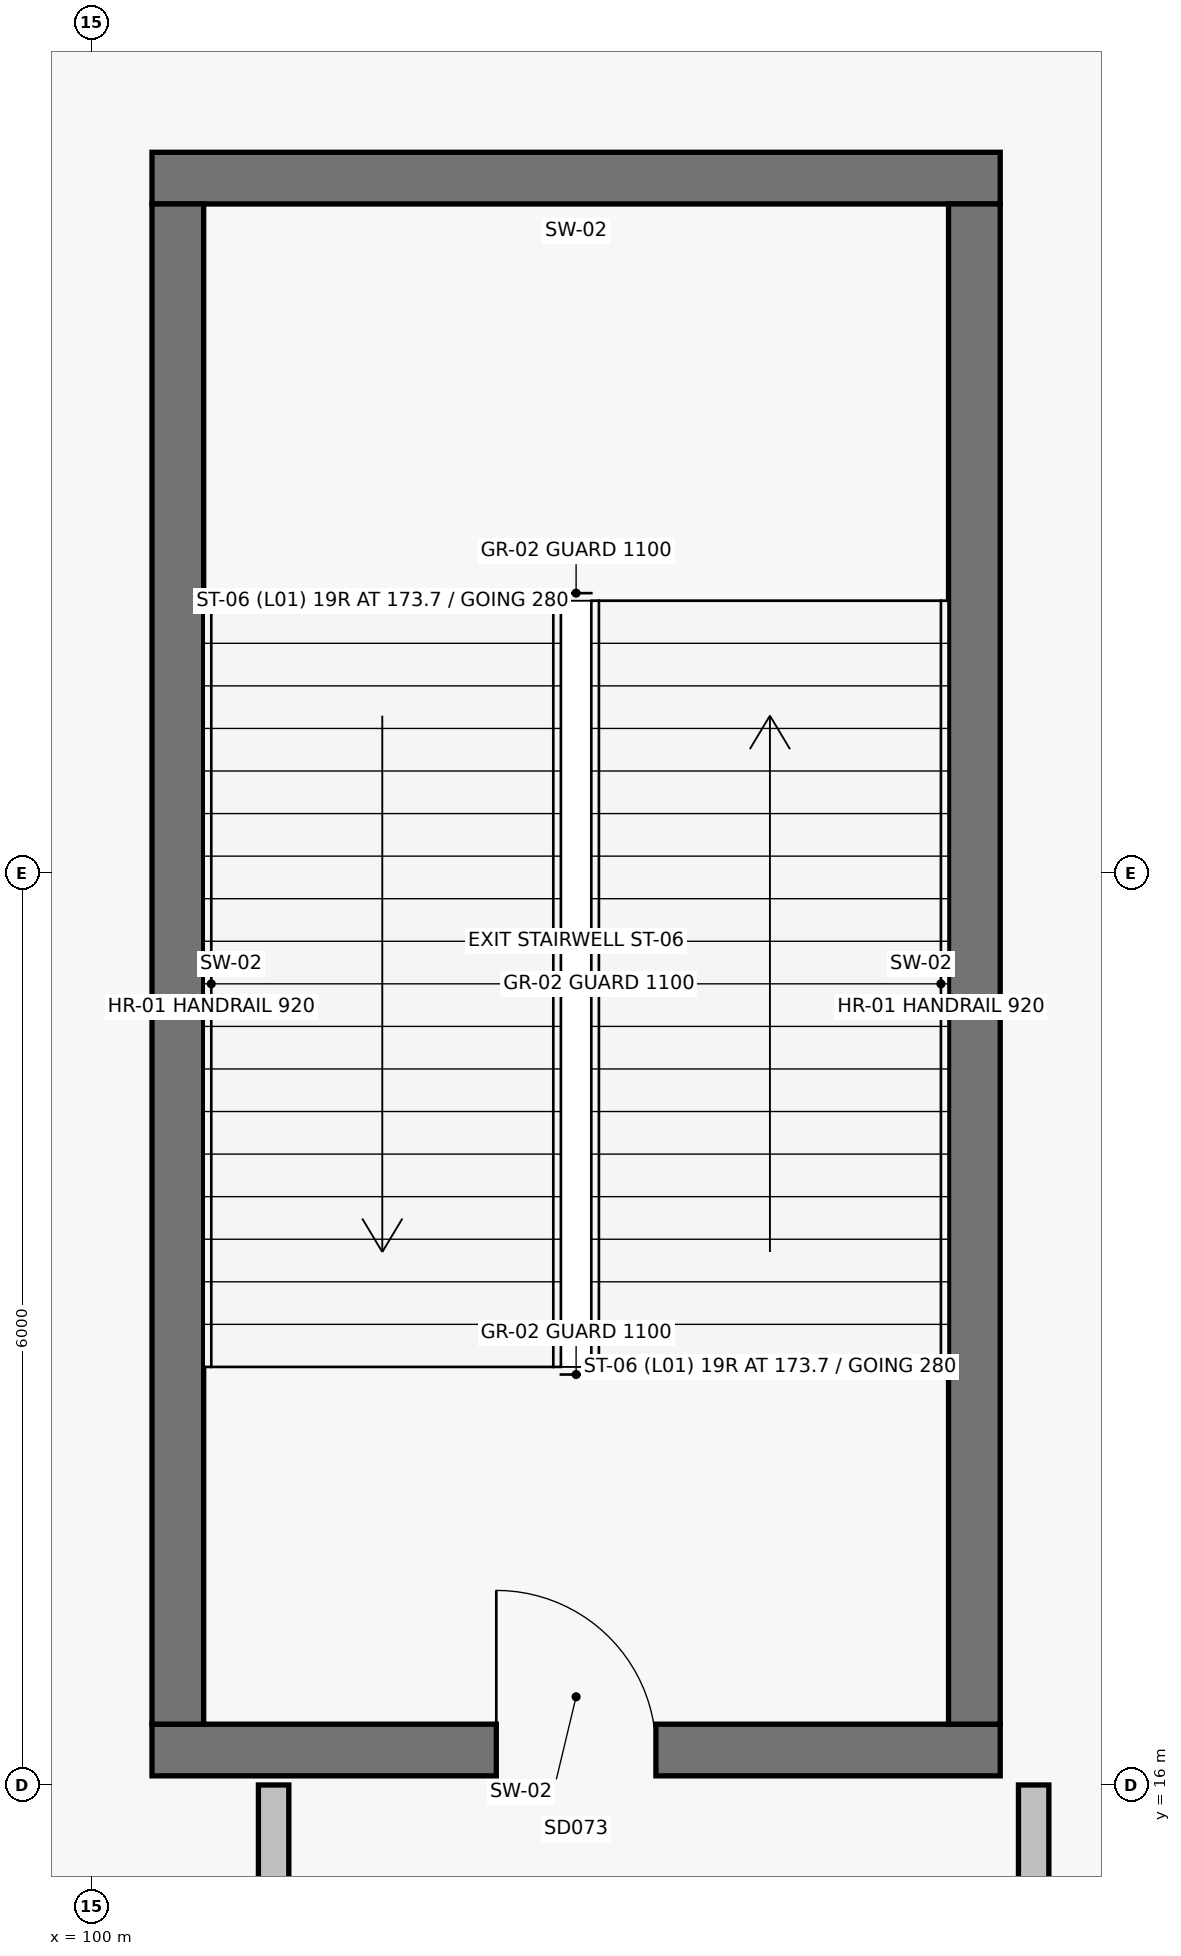
"""IFC4 building model, lengths in metres.
Left out: names, types, materials, properties, quantities, classifications, styles, units other than length and angle.
Written with IfcOpenShell. Run it as: python <this file> out.ifc"""

import sys

from ifc_helpers import new_model, si_unit, direction, frame, frame_2d, origin, origin_2d, place, context, subcontext, project, spatial, rectangle, hollow_rectangle, extrude, element, fill, save


model = new_model("IFC4")
c1 = context("Model", 3, precision=1e-05, world=origin(), true_north=direction((0.0, 1.0)))
c2 = subcontext(c1, "Body", "Model", "MODEL_VIEW")
j1 = project(units=[si_unit("LENGTHUNIT", "METRE"), si_unit("PLANEANGLEUNIT", "RADIAN")], contexts=[c1])
p1 = place(None, origin())
s1 = spatial("IfcSite", under=j1, at=p1, CompositionType="ELEMENT")
p2 = place(p1, origin())
s2 = spatial("IfcBuilding", under=s1, at=p2, CompositionType="ELEMENT")
p3 = place(p2, origin())
s3 = spatial("IfcBuildingStorey", under=s2, at=p3, CompositionType="ELEMENT", Elevation=0.0)
p4 = place(p3, frame((100.0, 16.0, 0.0), z_axis=(0.0, 0.0, 1.0), x_axis=(1.0, 0.0, 0.0)))
e1 = element("IfcColumn", 1, at=p4, inside=s3, PredefinedType="COLUMN", context=c2, shape_type="SweptSolid", body=[
    extrude(hollow_rectangle(XDim=0.305, YDim=0.305, WallThickness=0.013, InnerFilletRadius=0.013, OuterFilletRadius=0.025, at=origin_2d()), origin(), (0.0, 0.0, 1.0), 6.6),
])
p5 = place(p3, frame((100.4, 16.23, 0.0), z_axis=(0.0, 0.0, 1.0), x_axis=(1.0, 0.0, 0.0)))
e2 = element("IfcWall", 2, at=p5, inside=s3, PredefinedType="SHEAR", context=c2, shape_type="SweptSolid", body=[
    extrude(rectangle(XDim=5.58, YDim=0.34, at=frame_2d((2.79, 0.0))), origin(), (0.0, 0.0, 1.0), 6.32),
])
p6 = place(p5, frame((2.265, 0.0, 0.0)))
e3 = element("IfcOpeningElement", 3, at=p6, cuts=e2, PredefinedType="OPENING", context=c2, shape_type="SweptSolid", body=[
    extrude(rectangle(XDim=1.05, YDim=2.15, at=frame_2d((0.525, 1.075))), frame((0.0, 0.185, 0.0), z_axis=(0.0, -1.0, 0.0), x_axis=(1.0, 0.0, 0.0)), (0.0, 0.0, 1.0), 0.37),
])
p7 = place(p3, frame((105.98, 26.57, 0.0), z_axis=(0.0, 0.0, 1.0), x_axis=(-1.0, 0.0, 0.0)))
e4 = element("IfcWall", 4, at=p7, inside=s3, PredefinedType="SHEAR", context=c2, shape_type="SweptSolid", body=[
    extrude(rectangle(XDim=5.58, YDim=0.34, at=frame_2d((2.79, 0.0))), origin(), (0.0, 0.0, 1.0), 6.32),
])
for number, where, z_axis, x_axis in (
    (5, (100.57, 26.4, 0.0), (0.0, 0.0, 1.0), (0.0, -1.0, 0.0)),
    (6, (105.81, 16.4, 0.0), (0.0, 0.0, 1.0), (0.0, 1.0, 0.0)),
):
    element("IfcWall", number, at=place(p3, frame(where, z_axis=z_axis, x_axis=x_axis)), inside=s3, PredefinedType="SHEAR", context=c2, shape_type="SweptSolid", body=[
        extrude(rectangle(XDim=10.0, YDim=0.34, at=frame_2d((5.0, 0.0))), origin(), (0.0, 0.0, 1.0), 6.32),
    ])
for number, where, z_axis, x_axis in (
    (7, (101.2, 16.0, 0.0), (0.0, 0.0, 1.0), (0.0, -1.0, 0.0)),
    (8, (106.2, 12.88, 0.0), (0.0, 0.0, 1.0), (0.0, 1.0, 0.0)),
):
    element("IfcWall", number, at=place(p3, frame(where, z_axis=z_axis, x_axis=x_axis)), inside=s3, PredefinedType="PARTITIONING", context=c2, shape_type="SweptSolid", body=[
        extrude(rectangle(XDim=3.12, YDim=0.2, at=frame_2d((1.56, 0.0))), origin(), (0.0, 0.0, 1.0), 5.689),
    ])
p8 = place(p6, origin())
e9 = element("IfcDoor", 9, at=p8, inside=s3, OperationType="SINGLE_SWING_LEFT", PredefinedType="DOOR", context=c2, shape_type="SweptSolid", body=[
    extrude(rectangle(XDim=1.05, YDim=2.15, at=frame_2d((0.525, 1.075))), frame((0.0, 0.025, 0.0), z_axis=(0.0, -1.0, 0.0), x_axis=(1.0, 0.0, 0.0)), (0.0, 0.0, 1.0), 0.05),
])
fill(e3, e9)
save(model, sys.argv[1])
